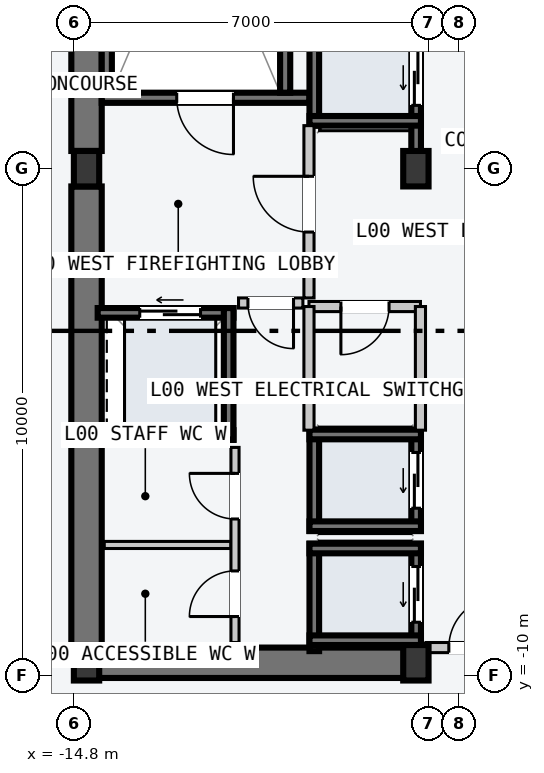
"""IFC4 building model, lengths in metres.
Left out: names, types, materials, properties, quantities, classifications, styles, units other than length and angle.
Written with IfcOpenShell. Run it as: python <this file> out.ifc"""

import sys

from ifc_helpers import new_model, si_unit, direction, frame, frame_2d, origin, origin_2d, place, context, subcontext, project, spatial, rectangle, i_section, extrude, element, fill, save


model = new_model("IFC4")
c1 = context("Model", 3, precision=1e-05, world=origin(), true_north=direction((0.0, 1.0)))
c2 = subcontext(c1, "Body", "Model", "MODEL_VIEW")
j1 = project(units=[si_unit("LENGTHUNIT", "METRE"), si_unit("PLANEANGLEUNIT", "RADIAN")], contexts=[c1])
p1 = place(None, origin())
s1 = spatial("IfcSite", under=j1, at=p1, CompositionType="ELEMENT")
p2 = place(p1, origin())
s2 = spatial("IfcBuilding", under=s1, at=p2, CompositionType="ELEMENT")
p3 = place(p2, origin())
s3 = spatial("IfcBuildingStorey", under=s2, at=p3, CompositionType="ELEMENT", Elevation=0.0)
p4 = place(p3, frame((-14.53, -9.75, -0.22), z_axis=(0.0, 0.0, 1.0), x_axis=(1.0, 0.0, 0.0)))
e1 = element("IfcWall", 1, at=p4, inside=s3, PredefinedType="SHEAR", context=c2, shape_type="SweptSolid", body=[
    extrude(rectangle(XDim=6.46, YDim=0.6, at=frame_2d((3.23, 0.0))), origin(), (0.0, 0.0, 1.0), 4.8),
])
for number, where, z_axis, x_axis in (
    (2, (-14.55, -9.4, -0.22), (0.0, 0.0, 1.0), (0.0, 1.0, 0.0)),
    (3, (-14.55, 0.35, -0.22), (0.0, 0.0, 1.0), (0.0, 1.0, 0.0)),
):
    element("IfcWall", number, at=place(p3, frame(where, z_axis=z_axis, x_axis=x_axis)), inside=s3, PredefinedType="SHEAR", context=c2, shape_type="SweptSolid", body=[
        extrude(rectangle(XDim=9.05, YDim=0.6, at=frame_2d((4.525, 0.0))), origin(), (0.0, 0.0, 1.0), 4.8),
    ])
p5 = place(p3, frame((-14.15, 1.5, -0.22), z_axis=(0.0, 0.0, 1.0), x_axis=(0.0, 1.0, 0.0)))
e4 = element("IfcWall", 4, at=p5, inside=s3, PredefinedType="SOLIDWALL", context=c2, shape_type="SweptSolid", body=[
    extrude(rectangle(XDim=7.8, YDim=0.2, at=frame_2d((3.9, 0.0))), origin(), (0.0, 0.0, 1.0), 4.8),
])
p6 = place(p3, frame((-10.15, 1.4, -0.22), z_axis=(0.0, 0.0, 1.0), x_axis=(-1.0, 0.0, 0.0)))
e5 = element("IfcWall", 5, at=p6, inside=s3, PredefinedType="SOLIDWALL", context=c2, shape_type="SweptSolid", body=[
    extrude(rectangle(XDim=4.1, YDim=0.2, at=frame_2d((2.05, 0.0))), origin(), (0.0, 0.0, 1.0), 4.8),
])
p7 = place(p6, frame((1.5, 0.0, 0.22)))
e6 = element("IfcOpeningElement", 6, at=p7, cuts=e5, PredefinedType="OPENING", context=c2, shape_type="SweptSolid", body=[
    extrude(rectangle(XDim=1.12, YDim=2.18, at=frame_2d((0.56, 1.09))), frame((0.0, 0.11, 0.0), z_axis=(0.0, -1.0, 0.0), x_axis=(1.0, 0.0, 0.0)), (0.0, 0.0, 1.0), 0.22),
])
p8 = place(p3, frame((-10.63, 1.5, -0.22), z_axis=(0.0, 0.0, 1.0), x_axis=(0.0, 1.0, 0.0)))
e7 = element("IfcWall", 7, at=p8, inside=s3, PredefinedType="SOLIDWALL", context=c2, shape_type="SweptSolid", body=[
    extrude(rectangle(XDim=7.8, YDim=0.2, at=frame_2d((3.9, 0.0))), origin(), (0.0, 0.0, 1.0), 4.8),
])
for number, where, z_axis, x_axis in (
    (8, (-14.55, -9.75, 0.0), (0.0, 0.0, 1.0), (1.0, 0.0, 0.0)),
    (9, (-14.55, 0.0, 0.0), (0.0, 0.0, 1.0), (1.0, 0.0, 0.0)),
    (10, (-8.05, -9.75, 0.0), (0.0, 0.0, 1.0), (1.0, 0.0, 0.0)),
    (11, (-8.05, 0.0, 0.0), (0.0, 0.0, 1.0), (1.0, 0.0, 0.0)),
):
    element("IfcColumn", number, at=place(p3, frame(where, z_axis=z_axis, x_axis=x_axis)), inside=s3, PredefinedType="COLUMN", context=c2, shape_type="SweptSolid", body=[
        extrude(i_section(OverallWidth=0.5, OverallDepth=0.7, WebThickness=0.028, FlangeThickness=0.045, at=origin_2d()), origin(), (0.0, 0.0, 1.0), 4.8),
    ])
p9 = place(p3, frame((-8.045, 0.21, -0.22), z_axis=(0.0, 0.0, 1.0), x_axis=(0.0, 1.0, 0.0)))
e12 = element("IfcWall", 12, at=p9, inside=s3, PredefinedType="SOLIDWALL", context=c2, shape_type="SweptSolid", body=[
    extrude(rectangle(XDim=2.54, YDim=0.19, at=frame_2d((1.27, 0.0))), origin(), (0.0, 0.0, 1.0), 4.8),
])
p10 = place(p9, frame((1.04, 0.0, 0.22)))
e13 = element("IfcOpeningElement", 13, at=p10, cuts=e12, PredefinedType="OPENING", context=c2, shape_type="SweptSolid", body=[
    extrude(rectangle(XDim=1.1, YDim=2.2, at=frame_2d((0.55, 1.1))), frame((0.0, 0.105, 0.0), z_axis=(0.0, -1.0, 0.0), x_axis=(1.0, 0.0, 0.0)), (0.0, 0.0, 1.0), 0.21),
])
p11 = place(p3, frame((-10.055, 0.85, -0.22), z_axis=(0.0, 0.0, 1.0), x_axis=(0.0, 1.0, 0.0)))
e14 = element("IfcWall", 14, at=p11, inside=s3, PredefinedType="SOLIDWALL", context=c2, shape_type="SweptSolid", body=[
    extrude(rectangle(XDim=1.9, YDim=0.19, at=frame_2d((0.95, 0.0))), origin(), (0.0, 0.0, 1.0), 4.8),
])
p12 = place(p3, frame((-10.15, 0.945, -0.22), z_axis=(0.0, 0.0, 1.0), x_axis=(1.0, 0.0, 0.0)))
e15 = element("IfcWall", 15, at=p12, inside=s3, PredefinedType="SOLIDWALL", context=c2, shape_type="SweptSolid", body=[
    extrude(rectangle(XDim=2.2, YDim=0.19, at=frame_2d((1.1, 0.0))), origin(), (0.0, 0.0, 1.0), 4.8),
])
p13 = place(p3, frame((-8.045, -9.52, -0.22), z_axis=(0.0, 0.0, 1.0), x_axis=(0.0, 1.0, 0.0)))
e16 = element("IfcWall", 16, at=p13, inside=s3, PredefinedType="SOLIDWALL", context=c2, shape_type="SweptSolid", body=[
    extrude(rectangle(XDim=2.12, YDim=0.19, at=frame_2d((1.06, 0.0))), origin(), (0.0, 0.0, 1.0), 4.8),
])
p14 = place(p13, frame((0.57, 0.0, 0.22)))
e17 = element("IfcOpeningElement", 17, at=p14, cuts=e16, PredefinedType="OPENING", context=c2, shape_type="SweptSolid", body=[
    extrude(rectangle(XDim=1.1, YDim=2.2, at=frame_2d((0.55, 1.1))), frame((0.0, 0.105, 0.0), z_axis=(0.0, -1.0, 0.0), x_axis=(1.0, 0.0, 0.0)), (0.0, 0.0, 1.0), 0.21),
])
p15 = place(p3, frame((-10.055, -9.52, -0.22), z_axis=(0.0, 0.0, 1.0), x_axis=(0.0, 1.0, 0.0)))
e18 = element("IfcWall", 18, at=p15, inside=s3, PredefinedType="SOLIDWALL", context=c2, shape_type="SweptSolid", body=[
    extrude(rectangle(XDim=2.12, YDim=0.19, at=frame_2d((1.06, 0.0))), origin(), (0.0, 0.0, 1.0), 4.8),
])
for number, where, z_axis, x_axis in (
    (19, (-10.15, -7.495, -0.22), (0.0, 0.0, 1.0), (1.0, 0.0, 0.0)),
    (20, (-10.15, -9.305, -0.22), (0.0, 0.0, 1.0), (1.0, 0.0, 0.0)),
):
    element("IfcWall", number, at=place(p3, frame(where, z_axis=z_axis, x_axis=x_axis)), inside=s3, PredefinedType="SOLIDWALL", context=c2, shape_type="SweptSolid", body=[
        extrude(rectangle(XDim=2.2, YDim=0.19, at=frame_2d((1.1, 0.0))), origin(), (0.0, 0.0, 1.0), 4.8),
    ])
p16 = place(p3, frame((-8.045, -7.15, -0.22), z_axis=(0.0, 0.0, 1.0), x_axis=(0.0, 1.0, 0.0)))
e21 = element("IfcWall", 21, at=p16, inside=s3, PredefinedType="SOLIDWALL", context=c2, shape_type="SweptSolid", body=[
    extrude(rectangle(XDim=2.0, YDim=0.19, at=frame_2d((1.0, 0.0))), origin(), (0.0, 0.0, 1.0), 4.8),
])
p17 = place(p16, frame((0.45, 0.0, 0.22)))
e22 = element("IfcOpeningElement", 22, at=p17, cuts=e21, PredefinedType="OPENING", context=c2, shape_type="SweptSolid", body=[
    extrude(rectangle(XDim=1.1, YDim=2.2, at=frame_2d((0.55, 1.1))), frame((0.0, 0.105, 0.0), z_axis=(0.0, -1.0, 0.0), x_axis=(1.0, 0.0, 0.0)), (0.0, 0.0, 1.0), 0.21),
])
p18 = place(p3, frame((-10.055, -7.15, -0.22), z_axis=(0.0, 0.0, 1.0), x_axis=(0.0, 1.0, 0.0)))
e23 = element("IfcWall", 23, at=p18, inside=s3, PredefinedType="SOLIDWALL", context=c2, shape_type="SweptSolid", body=[
    extrude(rectangle(XDim=2.0, YDim=0.19, at=frame_2d((1.0, 0.0))), origin(), (0.0, 0.0, 1.0), 4.8),
])
for number, where, z_axis, x_axis in (
    (24, (-10.15, -5.245, -0.22), (0.0, 0.0, 1.0), (1.0, 0.0, 0.0)),
    (25, (-10.15, -7.055, -0.22), (0.0, 0.0, 1.0), (1.0, 0.0, 0.0)),
):
    element("IfcWall", number, at=place(p3, frame(where, z_axis=z_axis, x_axis=x_axis)), inside=s3, PredefinedType="SOLIDWALL", context=c2, shape_type="SweptSolid", body=[
        extrude(rectangle(XDim=2.2, YDim=0.19, at=frame_2d((1.1, 0.0))), origin(), (0.0, 0.0, 1.0), 4.8),
    ])
p19 = place(p3, frame((-14.33, -2.845, -0.22), z_axis=(0.0, 0.0, 1.0), x_axis=(1.0, 0.0, 0.0)))
e26 = element("IfcWall", 26, at=p19, inside=s3, PredefinedType="SOLIDWALL", context=c2, shape_type="SweptSolid", body=[
    extrude(rectangle(XDim=2.68, YDim=0.19, at=frame_2d((1.34, 0.0))), origin(), (0.0, 0.0, 1.0), 4.8),
])
p20 = place(p19, frame((0.83, 0.0, 0.22)))
e27 = element("IfcOpeningElement", 27, at=p20, cuts=e26, PredefinedType="OPENING", context=c2, shape_type="SweptSolid", body=[
    extrude(rectangle(XDim=1.2, YDim=2.2, at=frame_2d((0.6, 1.1))), frame((0.0, 0.105, 0.0), z_axis=(0.0, -1.0, 0.0), x_axis=(1.0, 0.0, 0.0)), (0.0, 0.0, 1.0), 0.21),
])
p21 = place(p3, frame((-14.33, -5.255, -0.22), z_axis=(0.0, 0.0, 1.0), x_axis=(1.0, 0.0, 0.0)))
e28 = element("IfcWall", 28, at=p21, inside=s3, PredefinedType="SOLIDWALL", context=c2, shape_type="SweptSolid", body=[
    extrude(rectangle(XDim=2.68, YDim=0.19, at=frame_2d((1.34, 0.0))), origin(), (0.0, 0.0, 1.0), 4.8),
])
p22 = place(p3, frame((-11.745, -5.35, -0.22), z_axis=(0.0, 0.0, 1.0), x_axis=(0.0, 1.0, 0.0)))
e29 = element("IfcWall", 29, at=p22, inside=s3, PredefinedType="SOLIDWALL", context=c2, shape_type="SweptSolid", body=[
    extrude(rectangle(XDim=2.6, YDim=0.19, at=frame_2d((1.3, 0.0))), origin(), (0.0, 0.0, 1.0), 4.8),
])
p23 = place(p3, frame((-10.16, -2.55, 0.0), z_axis=(0.0, 0.0, 1.0), x_axis=(0.0, 1.0, 0.0)))
e30 = element("IfcWall", 30, at=p23, inside=s3, PredefinedType="PARTITIONING", context=c2, shape_type="SweptSolid", body=[
    extrude(rectangle(XDim=3.4, YDim=0.2, at=frame_2d((1.7, 0.0))), origin(), (0.0, 0.0, 1.0), 4.58),
])
p24 = place(p23, frame((1.3, 0.0, 0.0)))
e31 = element("IfcOpeningElement", 31, at=p24, cuts=e30, PredefinedType="OPENING", context=c2, shape_type="SweptSolid", body=[
    extrude(rectangle(XDim=1.1, YDim=2.15, at=frame_2d((0.55, 1.075))), frame((0.0, 0.11, 0.0), z_axis=(0.0, -1.0, 0.0), x_axis=(1.0, 0.0, 0.0)), (0.0, 0.0, 1.0), 0.22),
])
p25 = place(p3, frame((-10.28, -2.65, 0.0), z_axis=(0.0, 0.0, 1.0), x_axis=(-1.0, 0.0, 0.0)))
e32 = element("IfcWall", 32, at=p25, inside=s3, PredefinedType="PARTITIONING", context=c2, shape_type="SweptSolid", body=[
    extrude(rectangle(XDim=1.27, YDim=0.2, at=frame_2d((0.635, 0.0))), origin(), (0.0, 0.0, 1.0), 4.58),
])
p26 = place(p25, frame((0.185, 0.0, 0.0)))
e33 = element("IfcOpeningElement", 33, at=p26, cuts=e32, PredefinedType="OPENING", context=c2, shape_type="SweptSolid", body=[
    extrude(rectangle(XDim=0.9, YDim=2.15, at=frame_2d((0.45, 1.075))), frame((0.0, 0.11, 0.0), z_axis=(0.0, -1.0, 0.0), x_axis=(1.0, 0.0, 0.0)), (0.0, 0.0, 1.0), 0.22),
])
p27 = place(p3, frame((-7.96, -2.72, 0.0), z_axis=(0.0, 0.0, 1.0), x_axis=(-1.0, 0.0, 0.0)))
e34 = element("IfcWall", 34, at=p27, inside=s3, PredefinedType="PARTITIONING", context=c2, shape_type="SweptSolid", body=[
    extrude(rectangle(XDim=2.2, YDim=0.2, at=frame_2d((1.1, 0.0))), origin(), (0.0, 0.0, 1.0), 4.58),
])
p28 = place(p27, frame((0.62, 0.0, 0.0)))
e35 = element("IfcOpeningElement", 35, at=p28, cuts=e34, PredefinedType="OPENING", context=c2, shape_type="SweptSolid", body=[
    extrude(rectangle(XDim=0.95, YDim=2.1, at=frame_2d((0.475, 1.05))), frame((0.0, 0.11, 0.0), z_axis=(0.0, -1.0, 0.0), x_axis=(1.0, 0.0, 0.0)), (0.0, 0.0, 1.0), 0.22),
])
for number, where, z_axis, x_axis in (
    (36, (-7.96, -5.16, 0.0), (0.0, 0.0, 1.0), (0.0, 1.0, 0.0)),
    (37, (-10.16, -5.16, 0.0), (0.0, 0.0, 1.0), (0.0, 1.0, 0.0)),
):
    element("IfcWall", number, at=place(p3, frame(where, z_axis=z_axis, x_axis=x_axis)), inside=s3, PredefinedType="PARTITIONING", context=c2, shape_type="SweptSolid", body=[
        extrude(rectangle(XDim=2.44, YDim=0.2, at=frame_2d((1.22, 0.0))), origin(), (0.0, 0.0, 1.0), 4.58),
    ])
p29 = place(p3, frame((-11.7, -7.425, 0.0), z_axis=(0.0, 0.0, 1.0), x_axis=(-1.0, 0.0, 0.0)))
e38 = element("IfcWall", 38, at=p29, inside=s3, PredefinedType="PARTITIONING", context=c2, shape_type="SweptSolid", body=[
    extrude(rectangle(XDim=2.5, YDim=0.14, at=frame_2d((1.25, 0.0))), origin(), (0.0, 0.0, 1.0), 4.58),
])
p30 = place(p3, frame((-11.62, -9.35, 0.0), z_axis=(0.0, 0.0, 1.0), x_axis=(0.0, 1.0, 0.0)))
e39 = element("IfcWall", 39, at=p30, inside=s3, PredefinedType="PARTITIONING", context=c2, shape_type="SweptSolid", body=[
    extrude(rectangle(XDim=3.85, YDim=0.16, at=frame_2d((1.925, 0.0))), origin(), (0.0, 0.0, 1.0), 4.58),
])
p31 = place(p30, frame((0.512, 0.0, 0.0)))
e40 = element("IfcOpeningElement", 40, at=p31, cuts=e39, PredefinedType="OPENING", context=c2, shape_type="SweptSolid", body=[
    extrude(rectangle(XDim=0.9, YDim=2.15, at=frame_2d((0.45, 1.075))), frame((0.0, 0.09, 0.0), z_axis=(0.0, -1.0, 0.0), x_axis=(1.0, 0.0, 0.0)), (0.0, 0.0, 1.0), 0.18),
])
p32 = place(p30, frame((2.438, 0.0, 0.0)))
e41 = element("IfcOpeningElement", 41, at=p32, cuts=e39, PredefinedType="OPENING", context=c2, shape_type="SweptSolid", body=[
    extrude(rectangle(XDim=0.9, YDim=2.15, at=frame_2d((0.45, 1.075))), frame((0.0, 0.09, 0.0), z_axis=(0.0, -1.0, 0.0), x_axis=(1.0, 0.0, 0.0)), (0.0, 0.0, 1.0), 0.18),
])
p33 = place(p3, frame((-7.85, -9.45, 0.0), z_axis=(0.0, 0.0, 1.0), x_axis=(1.0, 0.0, 0.0)))
e42 = element("IfcWall", 42, at=p33, inside=s3, PredefinedType="PARTITIONING", context=c2, shape_type="SweptSolid", body=[
    extrude(rectangle(XDim=1.93, YDim=0.2, at=frame_2d((0.965, 0.0))), origin(), (0.0, 0.0, 1.0), 4.58),
])
p34 = place(p33, frame((0.45, 0.0, 0.0)))
e43 = element("IfcOpeningElement", 43, at=p34, cuts=e42, PredefinedType="OPENING", context=c2, shape_type="SweptSolid", body=[
    extrude(rectangle(XDim=1.0, YDim=2.15, at=frame_2d((0.5, 1.075))), frame((0.0, 0.11, 0.0), z_axis=(0.0, -1.0, 0.0), x_axis=(1.0, 0.0, 0.0)), (0.0, 0.0, 1.0), 0.22),
])
p35 = place(p7, origin())
e44 = element("IfcDoor", 44, at=p35, inside=s3, OperationType="SINGLE_SWING_LEFT", PredefinedType="DOOR", context=c2, shape_type="SweptSolid", body=[
    extrude(rectangle(XDim=1.12, YDim=2.18, at=frame_2d((0.56, 1.09))), frame((0.0, 0.025, 0.0), z_axis=(0.0, -1.0, 0.0), x_axis=(1.0, 0.0, 0.0)), (0.0, 0.0, 1.0), 0.05),
])
fill(e6, e44)
p36 = place(p10, origin())
e45 = element("IfcDoor", 45, at=p36, inside=s3, OperationType="SLIDING_TO_LEFT", PredefinedType="DOOR", context=c2, shape_type="SweptSolid", body=[
    extrude(rectangle(XDim=1.1, YDim=2.2, at=frame_2d((0.55, 1.1))), frame((0.0, 0.025, 0.0), z_axis=(0.0, -1.0, 0.0), x_axis=(1.0, 0.0, 0.0)), (0.0, 0.0, 1.0), 0.05),
])
fill(e13, e45)
p37 = place(p14, origin())
e46 = element("IfcDoor", 46, at=p37, inside=s3, OperationType="SLIDING_TO_LEFT", PredefinedType="DOOR", context=c2, shape_type="SweptSolid", body=[
    extrude(rectangle(XDim=1.1, YDim=2.2, at=frame_2d((0.55, 1.1))), frame((0.0, 0.025, 0.0), z_axis=(0.0, -1.0, 0.0), x_axis=(1.0, 0.0, 0.0)), (0.0, 0.0, 1.0), 0.05),
])
fill(e17, e46)
p38 = place(p17, origin())
e47 = element("IfcDoor", 47, at=p38, inside=s3, OperationType="SLIDING_TO_LEFT", PredefinedType="DOOR", context=c2, shape_type="SweptSolid", body=[
    extrude(rectangle(XDim=1.1, YDim=2.2, at=frame_2d((0.55, 1.1))), frame((0.0, 0.025, 0.0), z_axis=(0.0, -1.0, 0.0), x_axis=(1.0, 0.0, 0.0)), (0.0, 0.0, 1.0), 0.05),
])
fill(e22, e47)
p39 = place(p20, origin())
e48 = element("IfcDoor", 48, at=p39, inside=s3, OperationType="SLIDING_TO_LEFT", PredefinedType="DOOR", context=c2, shape_type="SweptSolid", body=[
    extrude(rectangle(XDim=1.2, YDim=2.2, at=frame_2d((0.6, 1.1))), frame((0.0, 0.025, 0.0), z_axis=(0.0, -1.0, 0.0), x_axis=(1.0, 0.0, 0.0)), (0.0, 0.0, 1.0), 0.05),
])
fill(e27, e48)
p40 = place(p24, origin())
e49 = element("IfcDoor", 49, at=p40, inside=s3, OperationType="SINGLE_SWING_RIGHT", PredefinedType="DOOR", context=c2, shape_type="SweptSolid", body=[
    extrude(rectangle(XDim=1.1, YDim=2.15, at=frame_2d((0.55, 1.075))), frame((0.0, 0.025, 0.0), z_axis=(0.0, -1.0, 0.0), x_axis=(1.0, 0.0, 0.0)), (0.0, 0.0, 1.0), 0.05),
])
fill(e31, e49)
p41 = place(p26, origin())
e50 = element("IfcDoor", 50, at=p41, inside=s3, OperationType="SINGLE_SWING_LEFT", PredefinedType="DOOR", context=c2, shape_type="SweptSolid", body=[
    extrude(rectangle(XDim=0.9, YDim=2.15, at=frame_2d((0.45, 1.075))), frame((0.0, 0.025, 0.0), z_axis=(0.0, -1.0, 0.0), x_axis=(1.0, 0.0, 0.0)), (0.0, 0.0, 1.0), 0.05),
])
fill(e33, e50)
p42 = place(p28, origin())
e51 = element("IfcDoor", 51, at=p42, inside=s3, OperationType="SINGLE_SWING_RIGHT", PredefinedType="DOOR", context=c2, shape_type="SweptSolid", body=[
    extrude(rectangle(XDim=0.95, YDim=2.1, at=frame_2d((0.475, 1.05))), frame((0.0, 0.025, 0.0), z_axis=(0.0, -1.0, 0.0), x_axis=(1.0, 0.0, 0.0)), (0.0, 0.0, 1.0), 0.05),
])
fill(e35, e51)
p43 = place(p31, origin())
e52 = element("IfcDoor", 52, at=p43, inside=s3, OperationType="SINGLE_SWING_LEFT", PredefinedType="DOOR", context=c2, shape_type="SweptSolid", body=[
    extrude(rectangle(XDim=0.9, YDim=2.15, at=frame_2d((0.45, 1.075))), frame((0.0, 0.025, 0.0), z_axis=(0.0, -1.0, 0.0), x_axis=(1.0, 0.0, 0.0)), (0.0, 0.0, 1.0), 0.05),
])
fill(e40, e52)
p44 = place(p32, origin())
e53 = element("IfcDoor", 53, at=p44, inside=s3, OperationType="SINGLE_SWING_RIGHT", PredefinedType="DOOR", context=c2, shape_type="SweptSolid", body=[
    extrude(rectangle(XDim=0.9, YDim=2.15, at=frame_2d((0.45, 1.075))), frame((0.0, 0.025, 0.0), z_axis=(0.0, -1.0, 0.0), x_axis=(1.0, 0.0, 0.0)), (0.0, 0.0, 1.0), 0.05),
])
fill(e41, e53)
p45 = place(p34, origin())
e54 = element("IfcDoor", 54, at=p45, inside=s3, OperationType="SINGLE_SWING_RIGHT", PredefinedType="DOOR", context=c2, shape_type="SweptSolid", body=[
    extrude(rectangle(XDim=1.0, YDim=2.15, at=frame_2d((0.5, 1.075))), frame((0.0, 0.025, 0.0), z_axis=(0.0, -1.0, 0.0), x_axis=(1.0, 0.0, 0.0)), (0.0, 0.0, 1.0), 0.05),
])
fill(e43, e54)
save(model, sys.argv[1])
